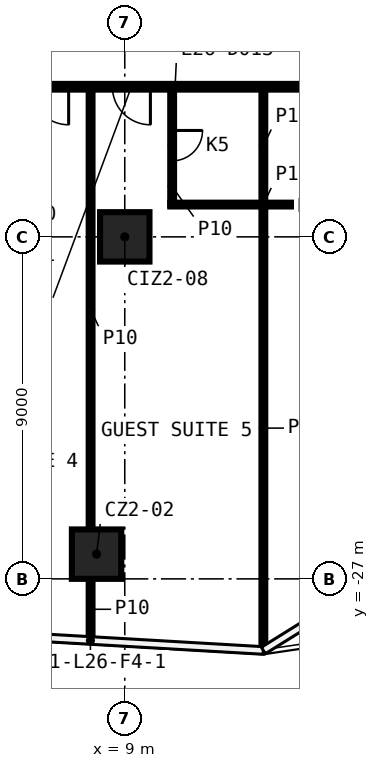
"""IFC4 building model, lengths in metres.
Left out: names, types, materials, properties, quantities, classifications, styles, units other than length and angle.
Written with IfcOpenShell. Run it as: python <this file> out.ifc"""

import sys

from ifc_helpers import new_model, si_unit, direction, frame, frame_2d, origin, origin_2d, place, context, subcontext, project, spatial, rectangle, extrude, element, fill, save


model = new_model("IFC4")
c1 = context("Model", 3, precision=1e-05, world=origin(), true_north=direction((0.0, 1.0)))
c2 = subcontext(c1, "Body", "Model", "MODEL_VIEW")
j1 = project(units=[si_unit("LENGTHUNIT", "METRE"), si_unit("PLANEANGLEUNIT", "RADIAN")], contexts=[c1])
p1 = place(None, origin())
s1 = spatial("IfcSite", under=j1, at=p1, CompositionType="ELEMENT")
p2 = place(p1, origin())
s2 = spatial("IfcBuilding", under=s1, at=p2, CompositionType="ELEMENT")
p3 = place(p2, frame((0.0, 0.0, 121.1)))
s3 = spatial("IfcBuildingStorey", under=s2, at=p3, CompositionType="ELEMENT", Elevation=121.1)
for number, where, z_axis, x_axis in (
    (1, (8.258, -26.349, 0.0), (0.0, 0.0, 1.0), (1.0, 0.0, 0.0)),
    (2, (9.0, -18.0, 0.0), (0.0, 0.0, 1.0), (1.0, 0.0, 0.0)),
):
    element("IfcColumn", number, at=place(p3, frame(where, z_axis=z_axis, x_axis=x_axis)), inside=s3, PredefinedType="COLUMN", context=c2, shape_type="SweptSolid", body=[
        extrude(rectangle(XDim=1.3, YDim=1.3, at=origin_2d()), origin(), (0.0, 0.0, 1.0), 3.3),
    ])
p4 = place(p3, frame((10.197, -17.15, 0.0), z_axis=(0.0, 0.0, 1.0), x_axis=(1.0, 0.0, 0.0)))
e3 = element("IfcWall", 3, at=p4, inside=s3, PredefinedType="PARTITIONING", context=c2, shape_type="SweptSolid", body=[
    extrude(rectangle(XDim=4.9, YDim=0.1, at=frame_2d((2.45, 0.0))), origin(), (0.0, 0.0, 1.0), 3.3),
])
p5 = place(p3, frame((17.125, -14.05, 0.0), z_axis=(0.0, 0.0, 1.0), x_axis=(-1.0, 0.0, 0.0)))
e4 = element("IfcWall", 4, at=p5, inside=s3, PredefinedType="PARTITIONING", context=c2, shape_type="SweptSolid", body=[
    extrude(rectangle(XDim=34.25, YDim=0.15, at=frame_2d((17.125, 0.0))), origin(), (0.0, 0.0, 1.0), 3.3),
])
p6 = place(p5, frame((32.089, 0.0, 0.0)))
e5 = element("IfcOpeningElement", 5, at=p6, cuts=e4, PredefinedType="OPENING", context=c2, shape_type="SweptSolid", body=[
    extrude(rectangle(XDim=0.9, YDim=2.1, at=frame_2d((0.45, 1.05))), frame((0.0, 0.085, 0.0), z_axis=(0.0, -1.0, 0.0), x_axis=(1.0, 0.0, 0.0)), (0.0, 0.0, 1.0), 0.17),
])
p7 = place(p5, frame((25.666, 0.0, 0.0)))
e6 = element("IfcOpeningElement", 6, at=p7, cuts=e4, PredefinedType="OPENING", context=c2, shape_type="SweptSolid", body=[
    extrude(rectangle(XDim=1.0, YDim=2.1, at=frame_2d((0.5, 1.05))), frame((0.0, 0.085, 0.0), z_axis=(0.0, -1.0, 0.0), x_axis=(1.0, 0.0, 0.0)), (0.0, 0.0, 1.0), 0.17),
])
p8 = place(p5, frame((18.714, 0.0, 0.0)))
e7 = element("IfcOpeningElement", 7, at=p8, cuts=e4, PredefinedType="OPENING", context=c2, shape_type="SweptSolid", body=[
    extrude(rectangle(XDim=1.0, YDim=2.1, at=frame_2d((0.5, 1.05))), frame((0.0, 0.085, 0.0), z_axis=(0.0, -1.0, 0.0), x_axis=(1.0, 0.0, 0.0)), (0.0, 0.0, 1.0), 0.17),
])
p9 = place(p5, frame((16.558, 0.0, 0.0)))
e8 = element("IfcOpeningElement", 8, at=p9, cuts=e4, PredefinedType="OPENING", context=c2, shape_type="SweptSolid", body=[
    extrude(rectangle(XDim=1.0, YDim=2.1, at=frame_2d((0.5, 1.05))), frame((0.0, 0.085, 0.0), z_axis=(0.0, -1.0, 0.0), x_axis=(1.0, 0.0, 0.0)), (0.0, 0.0, 1.0), 0.17),
])
p10 = place(p5, frame((9.602, 0.0, 0.0)))
e9 = element("IfcOpeningElement", 9, at=p10, cuts=e4, PredefinedType="OPENING", context=c2, shape_type="SweptSolid", body=[
    extrude(rectangle(XDim=1.0, YDim=2.1, at=frame_2d((0.5, 1.05))), frame((0.0, 0.085, 0.0), z_axis=(0.0, -1.0, 0.0), x_axis=(1.0, 0.0, 0.0)), (0.0, 0.0, 1.0), 0.17),
])
p11 = place(p5, frame((7.451, 0.0, 0.0)))
e10 = element("IfcOpeningElement", 10, at=p11, cuts=e4, PredefinedType="OPENING", context=c2, shape_type="SweptSolid", body=[
    extrude(rectangle(XDim=1.0, YDim=2.1, at=frame_2d((0.5, 1.05))), frame((0.0, 0.085, 0.0), z_axis=(0.0, -1.0, 0.0), x_axis=(1.0, 0.0, 0.0)), (0.0, 0.0, 1.0), 0.17),
])
p12 = place(p5, frame((0.576, 0.0, 0.0)))
e11 = element("IfcOpeningElement", 11, at=p12, cuts=e4, PredefinedType="OPENING", context=c2, shape_type="SweptSolid", body=[
    extrude(rectangle(XDim=1.0, YDim=2.1, at=frame_2d((0.5, 1.05))), frame((0.0, 0.085, 0.0), z_axis=(0.0, -1.0, 0.0), x_axis=(1.0, 0.0, 0.0)), (0.0, 0.0, 1.0), 0.17),
])
p13 = place(p3, frame((12.647, -28.864, 0.0), z_axis=(0.0, 0.0, 1.0), x_axis=(0.0, 1.0, 0.0)))
e12 = element("IfcWall", 12, at=p13, inside=s3, PredefinedType="PARTITIONING", context=c2, shape_type="SweptSolid", body=[
    extrude(rectangle(XDim=11.664, YDim=0.1, at=frame_2d((5.832, 0.0))), origin(), (0.0, 0.0, 1.0), 3.3),
])
p14 = place(p3, frame((12.647, -17.1, 0.0), z_axis=(0.0, 0.0, 1.0), x_axis=(0.0, 1.0, 0.0)))
e13 = element("IfcWall", 13, at=p14, inside=s3, PredefinedType="PARTITIONING", context=c2, shape_type="SweptSolid", body=[
    extrude(rectangle(XDim=2.975, YDim=0.1, at=frame_2d((1.488, 0.0))), origin(), (0.0, 0.0, 1.0), 3.3),
])
p15 = place(p3, frame((10.247, -14.125, 0.0), z_axis=(0.0, 0.0, 1.0), x_axis=(0.0, -1.0, 0.0)))
e14 = element("IfcWall", 14, at=p15, inside=s3, PredefinedType="PARTITIONING", context=c2, shape_type="SweptSolid", body=[
    extrude(rectangle(XDim=3.025, YDim=0.1, at=frame_2d((1.512, 0.0))), origin(), (0.0, 0.0, 1.0), 3.3),
])
p16 = place(p15, frame((1.075, 0.0, 0.0)))
e15 = element("IfcOpeningElement", 15, at=p16, cuts=e14, PredefinedType="OPENING", context=c2, shape_type="SweptSolid", body=[
    extrude(rectangle(XDim=0.8, YDim=2.1, at=frame_2d((0.4, 1.05))), frame((0.0, 0.06, 0.0), z_axis=(0.0, -1.0, 0.0), x_axis=(1.0, 0.0, 0.0)), (0.0, 0.0, 1.0), 0.12),
])
p17 = place(p3, frame((8.101, -28.601, 0.0), z_axis=(0.0, 0.0, 1.0), x_axis=(0.0, 1.0, 0.0)))
e16 = element("IfcWall", 16, at=p17, inside=s3, PredefinedType="PARTITIONING", context=c2, shape_type="SweptSolid", body=[
    extrude(rectangle(XDim=1.602, YDim=0.1, at=frame_2d((0.801, 0.0))), origin(), (0.0, 0.0, 1.0), 3.3),
])
p18 = place(p3, frame((8.101, -25.699, 0.0), z_axis=(0.0, 0.0, 1.0), x_axis=(0.0, 1.0, 0.0)))
e17 = element("IfcWall", 17, at=p18, inside=s3, PredefinedType="PARTITIONING", context=c2, shape_type="SweptSolid", body=[
    extrude(rectangle(XDim=11.574, YDim=0.1, at=frame_2d((5.787, 0.0))), origin(), (0.0, 0.0, 1.0), 3.3),
])
p19 = place(p10, origin())
e18 = element("IfcDoor", 18, at=p19, inside=s3, OperationType="SINGLE_SWING_RIGHT", PredefinedType="DOOR", context=c2, shape_type="SweptSolid", body=[
    extrude(rectangle(XDim=1.0, YDim=2.1, at=frame_2d((0.5, 1.05))), frame((0.0, 0.025, 0.0), z_axis=(0.0, -1.0, 0.0), x_axis=(1.0, 0.0, 0.0)), (0.0, 0.0, 1.0), 0.05),
])
fill(e9, e18)
p20 = place(p16, origin())
e19 = element("IfcDoor", 19, at=p20, inside=s3, OperationType="SINGLE_SWING_RIGHT", PredefinedType="DOOR", context=c2, shape_type="SweptSolid", body=[
    extrude(rectangle(XDim=0.8, YDim=2.1, at=frame_2d((0.4, 1.05))), frame((0.0, 0.025, 0.0), z_axis=(0.0, -1.0, 0.0), x_axis=(1.0, 0.0, 0.0)), (0.0, 0.0, 1.0), 0.05),
])
fill(e15, e19)
p21 = place(p11, origin())
e20 = element("IfcDoor", 20, at=p21, inside=s3, OperationType="SINGLE_SWING_LEFT", PredefinedType="DOOR", context=c2, shape_type="SweptSolid", body=[
    extrude(rectangle(XDim=1.0, YDim=2.1, at=frame_2d((0.5, 1.05))), frame((0.0, 0.025, 0.0), z_axis=(0.0, -1.0, 0.0), x_axis=(1.0, 0.0, 0.0)), (0.0, 0.0, 1.0), 0.05),
])
fill(e10, e20)
save(model, sys.argv[1])
